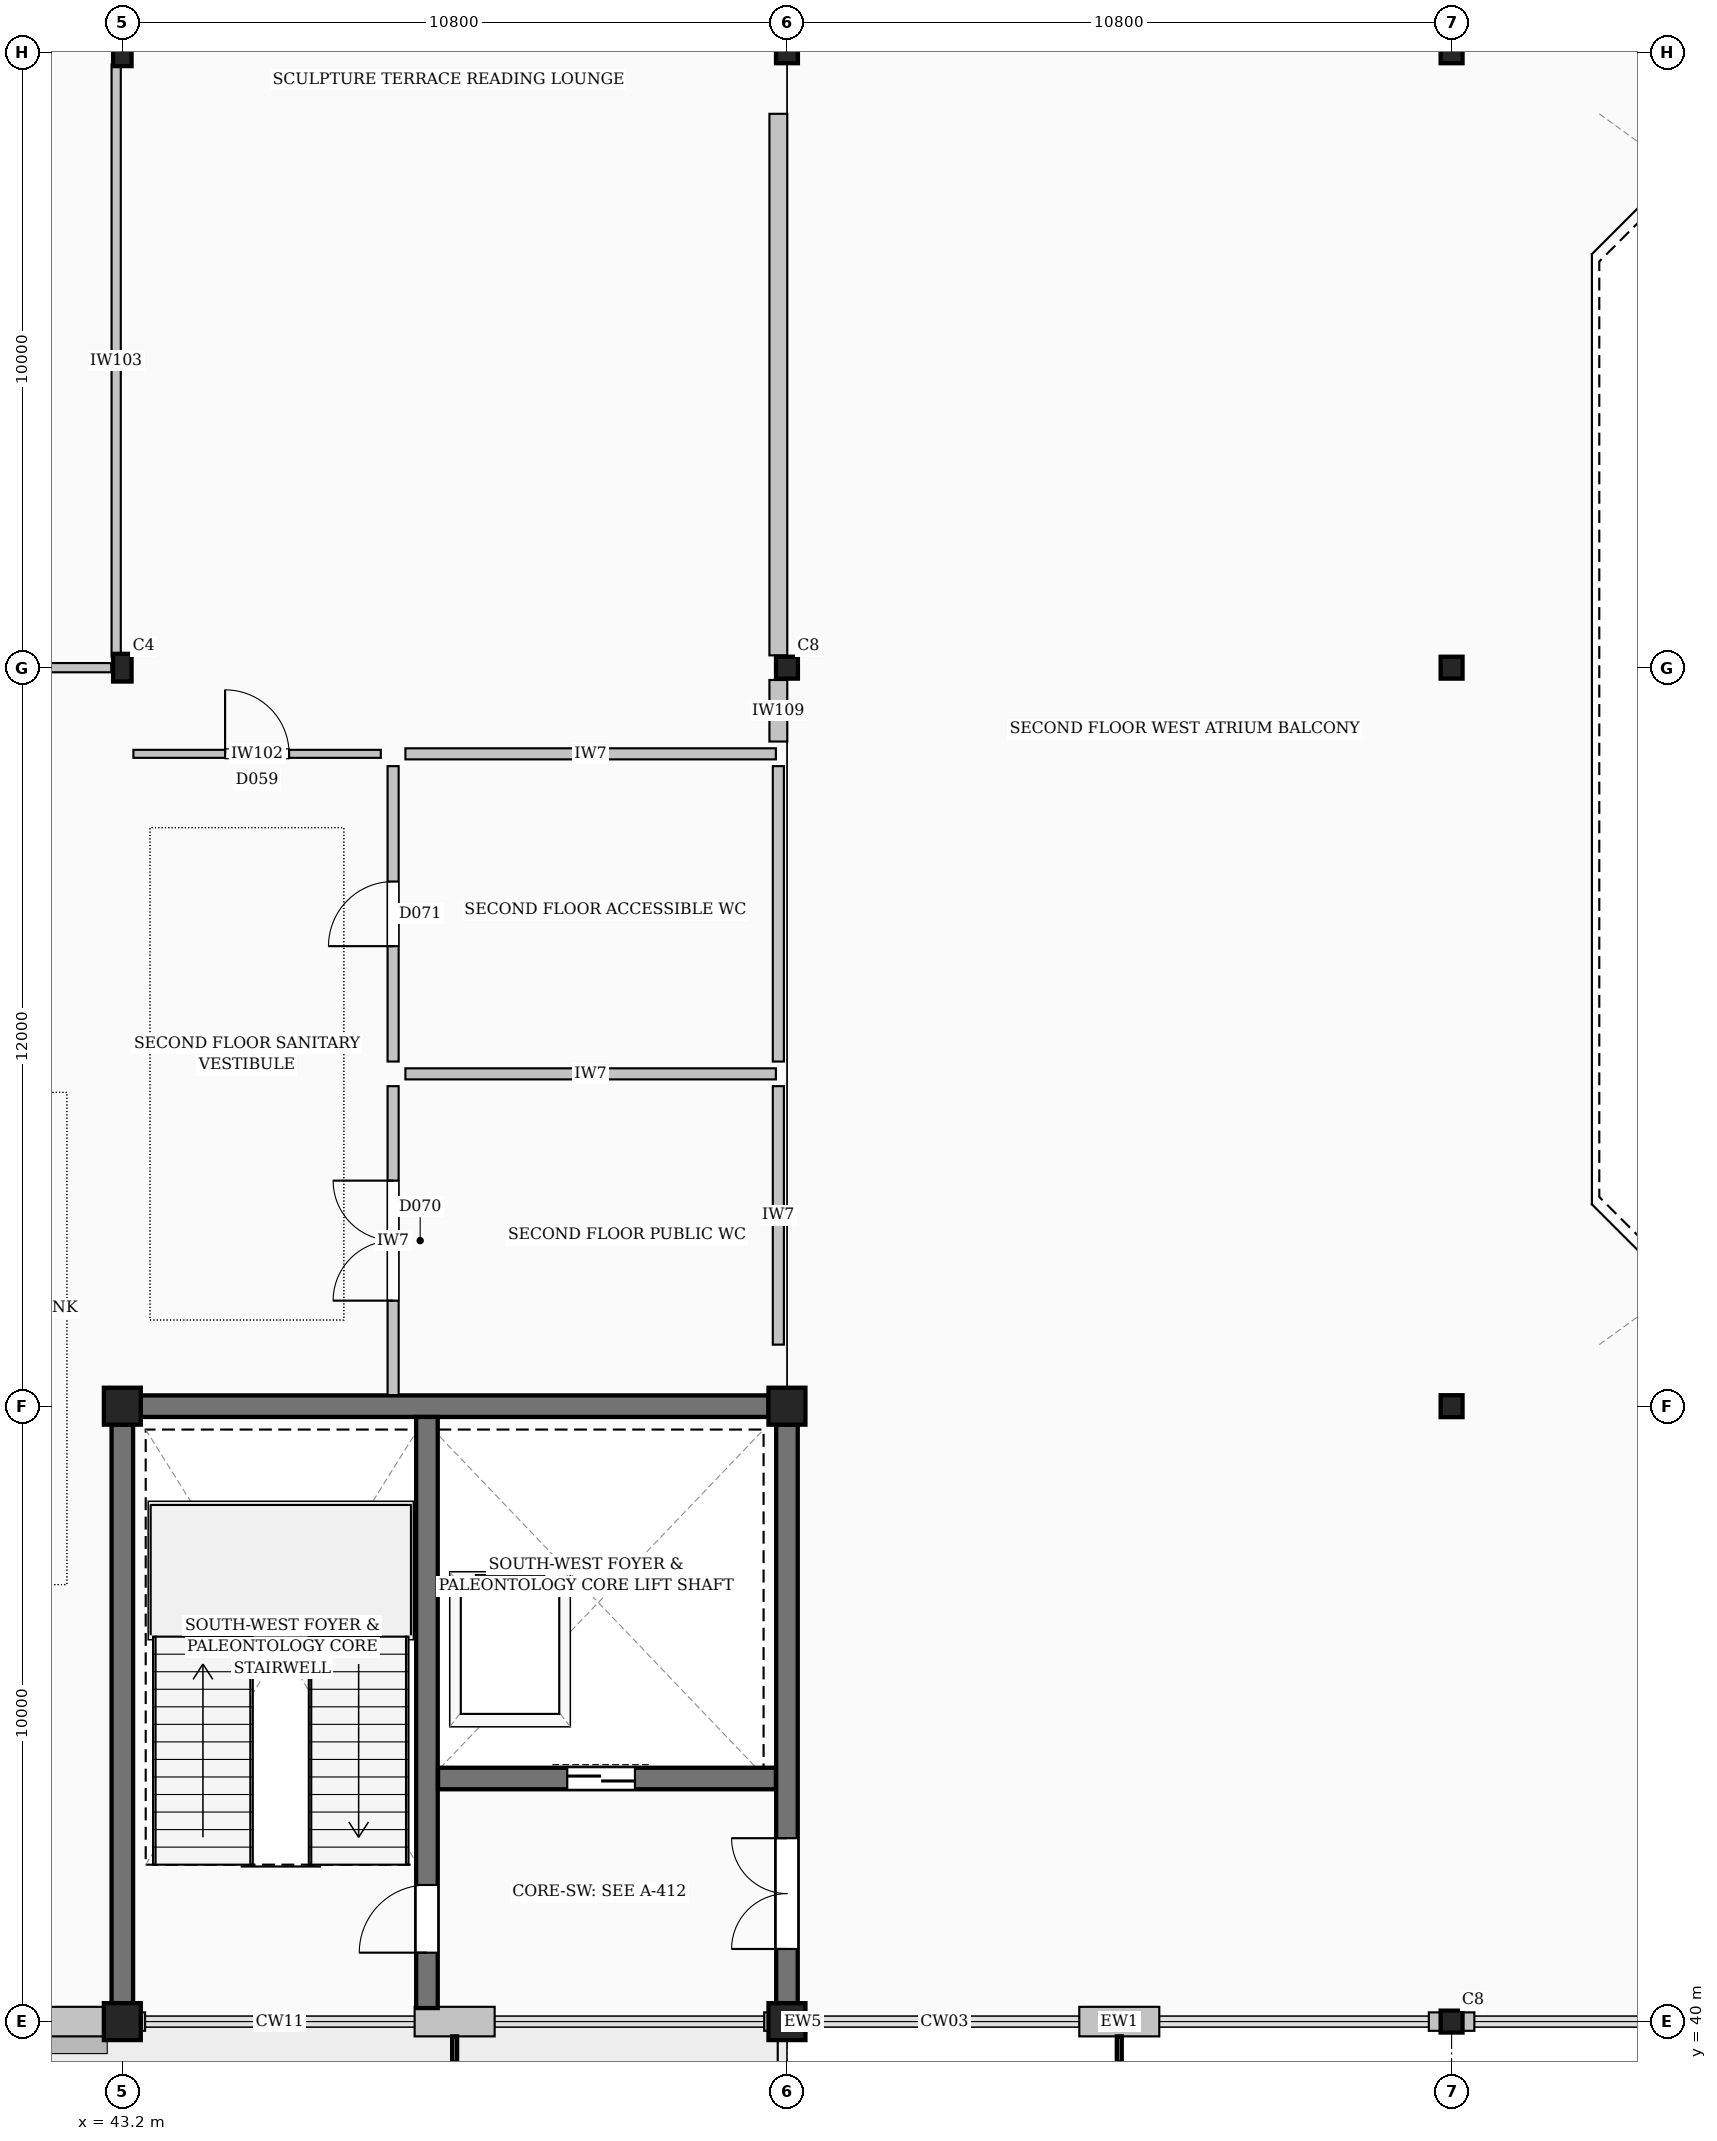
"""IFC4 building model, lengths in metres.
Left out: names, types, materials, properties, quantities, classifications, styles, units other than length and angle.
Written with IfcOpenShell. Run it as: python <this file> out.ifc"""

import sys

from ifc_helpers import new_model, si_unit, direction, frame, frame_2d, origin, origin_2d, place, context, subcontext, project, spatial, rectangle, hollow_circle, i_section, extrude, element, fill, save


model = new_model("IFC4")
c1 = context("Model", 3, precision=1e-05, world=origin(), true_north=direction((0.0, 1.0)))
c2 = subcontext(c1, "Body", "Model", "MODEL_VIEW")
j1 = project(units=[si_unit("LENGTHUNIT", "METRE"), si_unit("PLANEANGLEUNIT", "RADIAN")], contexts=[c1])
p1 = place(None, origin())
s1 = spatial("IfcSite", under=j1, at=p1, CompositionType="ELEMENT")
p2 = place(p1, origin())
s2 = spatial("IfcBuilding", under=s1, at=p2, CompositionType="ELEMENT")
p3 = place(p2, frame((0.0, 0.0, 9.6)))
s3 = spatial("IfcBuildingStorey", under=s2, at=p3, CompositionType="ELEMENT", Elevation=9.6)
for number, where, z_axis, x_axis in (
    (1, (43.2, 40.0, 0.0), (0.0, 0.0, 1.0), (1.0, 0.0, 0.0)),
    (2, (43.2, 50.0, 0.0), (0.0, 0.0, 1.0), (1.0, 0.0, 0.0)),
):
    element("IfcColumn", number, at=place(p3, frame(where, z_axis=z_axis, x_axis=x_axis)), inside=s3, PredefinedType="COLUMN", context=c2, shape_type="SweptSolid", body=[
        extrude(rectangle(XDim=0.6, YDim=0.6, at=origin_2d()), origin(), (0.0, 0.0, 1.0), 4.8),
    ])
for number, where, z_axis, x_axis in (
    (3, (43.2, 62.0, 0.0), (0.0, 0.0, 1.0), (1.0, 0.0, 0.0)),
    (4, (43.2, 72.0, 0.0), (0.0, 0.0, 1.0), (1.0, 0.0, 0.0)),
):
    element("IfcColumn", number, at=place(p3, frame(where, z_axis=z_axis, x_axis=x_axis)), inside=s3, PredefinedType="COLUMN", context=c2, shape_type="SweptSolid", body=[
        extrude(i_section(OverallWidth=0.3, OverallDepth=0.45, WebThickness=0.014, FlangeThickness=0.026, FilletRadius=0.027, at=origin_2d()), origin(), (0.0, 0.0, 1.0), 4.8),
    ])
for number, where, z_axis, x_axis in (
    (5, (54.0, 40.0, 0.0), (0.0, 0.0, 1.0), (1.0, 0.0, 0.0)),
    (6, (54.0, 50.0, 0.0), (0.0, 0.0, 1.0), (1.0, 0.0, 0.0)),
):
    element("IfcColumn", number, at=place(p3, frame(where, z_axis=z_axis, x_axis=x_axis)), inside=s3, PredefinedType="COLUMN", context=c2, shape_type="SweptSolid", body=[
        extrude(rectangle(XDim=0.6, YDim=0.6, at=origin_2d()), origin(), (0.0, 0.0, 1.0), 4.8),
    ])
for number, where, z_axis, x_axis in (
    (7, (54.0, 62.0, 0.0), (0.0, 0.0, 1.0), (1.0, 0.0, 0.0)),
    (8, (54.0, 72.0, 0.0), (0.0, 0.0, 1.0), (1.0, 0.0, 0.0)),
    (9, (64.8, 40.0, 0.0), (0.0, 0.0, 1.0), (1.0, 0.0, 0.0)),
    (10, (64.8, 50.0, 0.0), (0.0, 0.0, 1.0), (1.0, 0.0, 0.0)),
    (11, (64.8, 62.0, 0.0), (0.0, 0.0, 1.0), (1.0, 0.0, 0.0)),
    (12, (64.8, 72.0, 0.0), (0.0, 0.0, 1.0), (1.0, 0.0, 0.0)),
):
    element("IfcColumn", number, at=place(p3, frame(where, z_axis=z_axis, x_axis=x_axis)), inside=s3, PredefinedType="COLUMN", context=c2, shape_type="SweptSolid", body=[
        extrude(hollow_circle(Radius=0.178, WallThickness=0.016, at=origin_2d()), origin(), (0.0, 0.0, 1.0), 4.8),
    ])
p4 = place(p3, frame((32.545, 40.0, 0.0), z_axis=(0.0, 0.0, 1.0), x_axis=(1.0, 0.0, 0.0)))
e13 = element("IfcWall", 13, at=p4, inside=s3, PredefinedType="STANDARD", context=c2, shape_type="SweptSolid", body=[
    extrude(rectangle(XDim=10.51, YDim=0.48, at=frame_2d((5.255, 0.0))), origin(), (0.0, 0.0, 1.0), 4.09),
])
p5 = place(p4, frame((4.155, 0.0, 0.0)))
e14 = element("IfcOpeningElement", 14, at=p5, cuts=e13, PredefinedType="OPENING", context=c2, shape_type="SweptSolid", body=[
    extrude(rectangle(XDim=2.2, YDim=2.4, at=frame_2d((1.1, 1.2))), frame((0.0, 0.25, 0.0), z_axis=(0.0, -1.0, 0.0), x_axis=(1.0, 0.0, 0.0)), (0.0, 0.0, 1.0), 0.5),
])
p6 = place(p3, frame((47.95, 40.0, 0.0), z_axis=(0.0, 0.0, 1.0), x_axis=(1.0, 0.0, 0.0)))
e15 = element("IfcWall", 15, at=p6, inside=s3, PredefinedType="STANDARD", context=c2, shape_type="SweptSolid", body=[
    extrude(rectangle(XDim=1.3, YDim=0.48, at=frame_2d((0.65, 0.0))), origin(), (0.0, 0.0, 1.0), 4.09),
])
for number, where, z_axis, x_axis in (
    (16, (43.345, 40.0, 0.0), (0.0, 0.0, 1.0), (1.0, 0.0, 0.0)),
    (17, (53.63, 40.0, 0.0), (0.0, 0.0, 1.0), (1.0, 0.0, 0.0)),
):
    element("IfcWall", number, at=place(p3, frame(where, z_axis=z_axis, x_axis=x_axis)), inside=s3, PredefinedType="STANDARD", context=c2, shape_type="SweptSolid", body=[
        extrude(rectangle(XDim=0.225, YDim=0.3, at=frame_2d((0.113, 0.0))), origin(), (0.0, 0.0, 1.0), 4.56),
    ])
p7 = place(p3, frame((58.75, 40.0, 0.0), z_axis=(0.0, 0.0, 1.0), x_axis=(1.0, 0.0, 0.0)))
e18 = element("IfcWall", 18, at=p7, inside=s3, PredefinedType="STANDARD", context=c2, shape_type="SweptSolid", body=[
    extrude(rectangle(XDim=1.3, YDim=0.48, at=frame_2d((0.65, 0.0))), origin(), (0.0, 0.0, 1.0), 4.11),
])
for number, where, z_axis, x_axis in (
    (19, (54.145, 40.0, 0.0), (0.0, 0.0, 1.0), (1.0, 0.0, 0.0)),
    (20, (64.43, 40.0, 0.0), (0.0, 0.0, 1.0), (1.0, 0.0, 0.0)),
):
    element("IfcWall", number, at=place(p3, frame(where, z_axis=z_axis, x_axis=x_axis)), inside=s3, PredefinedType="STANDARD", context=c2, shape_type="SweptSolid", body=[
        extrude(rectangle(XDim=0.225, YDim=0.3, at=frame_2d((0.113, 0.0))), origin(), (0.0, 0.0, 1.0), 4.56),
    ])
p8 = place(p3, frame((64.945, 40.0, 0.0), z_axis=(0.0, 0.0, 1.0), x_axis=(1.0, 0.0, 0.0)))
e21 = element("IfcWall", 21, at=p8, inside=s3, PredefinedType="STANDARD", context=c2, shape_type="SweptSolid", body=[
    extrude(rectangle(XDim=0.225, YDim=0.3, at=frame_2d((0.112, 0.0))), origin(), (0.0, 0.0, 1.0), 4.56),
])
p9 = place(p3, frame((43.5, 50.0, 0.0), z_axis=(0.0, 0.0, 1.0), x_axis=(1.0, 0.0, 0.0)))
e22 = element("IfcWall", 22, at=p9, inside=s3, PredefinedType="SHEAR", context=c2, shape_type="SweptSolid", body=[
    extrude(rectangle(XDim=10.2, YDim=0.35, at=frame_2d((5.1, 0.0))), origin(), (0.0, 0.0, 1.0), 4.56),
])
p10 = place(p3, frame((43.2, 40.3, 0.0), z_axis=(0.0, 0.0, 1.0), x_axis=(0.0, 1.0, 0.0)))
e23 = element("IfcWall", 23, at=p10, inside=s3, PredefinedType="SHEAR", context=c2, shape_type="SweptSolid", body=[
    extrude(rectangle(XDim=9.4, YDim=0.35, at=frame_2d((4.7, 0.0))), origin(), (0.0, 0.0, 1.0), 4.56),
])
p11 = place(p3, frame((54.0, 40.3, 0.0), z_axis=(0.0, 0.0, 1.0), x_axis=(0.0, 1.0, 0.0)))
e24 = element("IfcWall", 24, at=p11, inside=s3, PredefinedType="SHEAR", context=c2, shape_type="SweptSolid", body=[
    extrude(rectangle(XDim=9.4, YDim=0.35, at=frame_2d((4.7, 0.0))), origin(), (0.0, 0.0, 1.0), 4.56),
])
p12 = place(p11, frame((0.88, 0.0, 0.0)))
e25 = element("IfcOpeningElement", 25, at=p12, cuts=e24, PredefinedType="OPENING", context=c2, shape_type="SweptSolid", body=[
    extrude(rectangle(XDim=1.8, YDim=2.25, at=frame_2d((0.9, 1.125))), frame((0.0, 0.185, 0.0), z_axis=(0.0, -1.0, 0.0), x_axis=(1.0, 0.0, 0.0)), (0.0, 0.0, 1.0), 0.37),
])
p13 = place(p3, frame((48.15, 40.22, 0.0), z_axis=(0.0, 0.0, 1.0), x_axis=(0.0, 1.0, 0.0)))
e26 = element("IfcWall", 26, at=p13, inside=s3, PredefinedType="SHEAR", context=c2, shape_type="SweptSolid", body=[
    extrude(rectangle(XDim=9.605, YDim=0.35, at=frame_2d((4.802, 0.0))), origin(), (0.0, 0.0, 1.0), 4.56),
])
p14 = place(p13, frame((0.9, 0.0, 0.0)))
e27 = element("IfcOpeningElement", 27, at=p14, cuts=e26, PredefinedType="OPENING", context=c2, shape_type="SweptSolid", body=[
    extrude(rectangle(XDim=1.1, YDim=2.2, at=frame_2d((0.55, 1.1))), frame((0.0, 0.185, 0.0), z_axis=(0.0, -1.0, 0.0), x_axis=(1.0, 0.0, 0.0)), (0.0, 0.0, 1.0), 0.37),
])
p15 = place(p3, frame((48.33, 43.95, 0.0), z_axis=(0.0, 0.0, 1.0), x_axis=(1.0, 0.0, 0.0)))
e28 = element("IfcWall", 28, at=p15, inside=s3, PredefinedType="SHEAR", context=c2, shape_type="SweptSolid", body=[
    extrude(rectangle(XDim=5.49, YDim=0.35, at=frame_2d((2.745, 0.0))), origin(), (0.0, 0.0, 1.0), 4.56),
])
p16 = place(p15, frame((2.1, 0.0, 0.0)))
e29 = element("IfcOpeningElement", 29, at=p16, cuts=e28, PredefinedType="OPENING", context=c2, shape_type="SweptSolid", body=[
    extrude(rectangle(XDim=1.1, YDim=2.2, at=frame_2d((0.55, 1.1))), frame((0.0, 0.185, 0.0), z_axis=(0.0, -1.0, 0.0), x_axis=(1.0, 0.0, 0.0)), (0.0, 0.0, 1.0), 0.37),
])
p17 = place(p3, frame((43.38, 60.6, 0.0), z_axis=(0.0, 0.0, 1.0), x_axis=(1.0, 0.0, 0.0)))
e30 = element("IfcWall", 30, at=p17, inside=s3, PredefinedType="PARTITIONING", context=c2, shape_type="SweptSolid", body=[
    extrude(rectangle(XDim=4.02, YDim=0.13, at=frame_2d((2.01, 0.0))), origin(), (0.0, 0.0, 1.0), 4.52),
])
p18 = place(p17, frame((1.49, 0.0, 0.0)))
e31 = element("IfcOpeningElement", 31, at=p18, cuts=e30, PredefinedType="OPENING", context=c2, shape_type="SweptSolid", body=[
    extrude(rectangle(XDim=1.04, YDim=2.2, at=frame_2d((0.52, 1.1))), frame((0.0, 0.075, 0.0), z_axis=(0.0, -1.0, 0.0), x_axis=(1.0, 0.0, 0.0)), (0.0, 0.0, 1.0), 0.15),
])
p19 = place(p3, frame((38.2, 62.0, 0.0), z_axis=(0.0, 0.0, 1.0), x_axis=(1.0, 0.0, 0.0)))
e32 = element("IfcWall", 32, at=p19, inside=s3, PredefinedType="PARTITIONING", context=c2, shape_type="SweptSolid", body=[
    extrude(rectangle(XDim=4.82, YDim=0.15, at=frame_2d((2.41, 0.0))), origin(), (0.0, 0.0, 1.0), 4.099),
])
p20 = place(p19, frame((1.9, 0.0, 0.0)))
e33 = element("IfcOpeningElement", 33, at=p20, cuts=e32, PredefinedType="OPENING", context=c2, shape_type="SweptSolid", body=[
    extrude(rectangle(XDim=1.02, YDim=2.2, at=frame_2d((0.51, 1.1))), frame((0.0, 0.085, 0.0), z_axis=(0.0, -1.0, 0.0), x_axis=(1.0, 0.0, 0.0)), (0.0, 0.0, 1.0), 0.17),
])
p21 = place(p3, frame((47.6, 50.18, 0.0), z_axis=(0.0, 0.0, 1.0), x_axis=(0.0, 1.0, 0.0)))
e34 = element("IfcWall", 34, at=p21, inside=s3, PredefinedType="PLUMBINGWALL", context=c2, shape_type="SweptSolid", body=[
    extrude(rectangle(XDim=5.02, YDim=0.18, at=frame_2d((2.51, 0.0))), origin(), (0.0, 0.0, 1.0), 4.52),
])
p22 = place(p21, frame((1.535, 0.0, 0.0)))
e35 = element("IfcOpeningElement", 35, at=p22, cuts=e34, PredefinedType="OPENING", context=c2, shape_type="SweptSolid", body=[
    extrude(rectangle(XDim=1.95, YDim=2.5, at=frame_2d((0.975, 1.25))), frame((0.0, 0.1, 0.0), z_axis=(0.0, -1.0, 0.0), x_axis=(1.0, 0.0, 0.0)), (0.0, 0.0, 1.0), 0.2),
])
p23 = place(p3, frame((47.6, 55.6, 0.0), z_axis=(0.0, 0.0, 1.0), x_axis=(0.0, 1.0, 0.0)))
e36 = element("IfcWall", 36, at=p23, inside=s3, PredefinedType="PLUMBINGWALL", context=c2, shape_type="SweptSolid", body=[
    extrude(rectangle(XDim=4.8, YDim=0.18, at=frame_2d((2.4, 0.0))), origin(), (0.0, 0.0, 1.0), 4.52),
])
p24 = place(p23, frame((1.875, 0.0, 0.0)))
e37 = element("IfcOpeningElement", 37, at=p24, cuts=e36, PredefinedType="OPENING", context=c2, shape_type="SweptSolid", body=[
    extrude(rectangle(XDim=1.05, YDim=2.15, at=frame_2d((0.525, 1.075))), frame((0.0, 0.1, 0.0), z_axis=(0.0, -1.0, 0.0), x_axis=(1.0, 0.0, 0.0)), (0.0, 0.0, 1.0), 0.2),
])
for number, where, z_axis, x_axis in (
    (38, (47.8, 55.4, 0.0), (0.0, 0.0, 1.0), (1.0, 0.0, 0.0)),
    (39, (47.8, 60.6, 0.0), (0.0, 0.0, 1.0), (1.0, 0.0, 0.0)),
):
    element("IfcWall", number, at=place(p3, frame(where, z_axis=z_axis, x_axis=x_axis)), inside=s3, PredefinedType="PLUMBINGWALL", context=c2, shape_type="SweptSolid", body=[
        extrude(rectangle(XDim=6.02, YDim=0.18, at=frame_2d((3.01, 0.0))), origin(), (0.0, 0.0, 1.0), 4.52),
    ])
p25 = place(p3, frame((43.1, 62.18, 0.0), z_axis=(0.0, 0.0, 1.0), x_axis=(0.0, 1.0, 0.0)))
e40 = element("IfcWall", 40, at=p25, inside=s3, PredefinedType="PARTITIONING", context=c2, shape_type="SweptSolid", body=[
    extrude(rectangle(XDim=9.62, YDim=0.15, at=frame_2d((4.81, 0.0))), origin(), (0.0, 0.0, 1.0), 4.039),
])
p26 = place(p3, frame((53.86, 51.0, 0.0), z_axis=(0.0, 0.0, 1.0), x_axis=(0.0, 1.0, 0.0)))
e41 = element("IfcWall", 41, at=p26, inside=s3, PredefinedType="PLUMBINGWALL", context=c2, shape_type="SweptSolid", body=[
    extrude(rectangle(XDim=4.2, YDim=0.18, at=frame_2d((2.1, 0.0))), origin(), (0.0, 0.0, 1.0), 4.52),
])
p27 = place(p3, frame((53.86, 55.6, 0.0), z_axis=(0.0, 0.0, 1.0), x_axis=(0.0, 1.0, 0.0)))
e42 = element("IfcWall", 42, at=p27, inside=s3, PredefinedType="PLUMBINGWALL", context=c2, shape_type="SweptSolid", body=[
    extrude(rectangle(XDim=4.8, YDim=0.18, at=frame_2d((2.4, 0.0))), origin(), (0.0, 0.0, 1.0), 4.52),
])
p28 = place(p3, frame((53.86, 60.8, 0.0), z_axis=(0.0, 0.0, 1.0), x_axis=(0.0, 1.0, 0.0)))
e43 = element("IfcWall", 43, at=p28, inside=s3, PredefinedType="PARTITIONING", context=c2, shape_type="SweptSolid", body=[
    extrude(rectangle(XDim=1.0, YDim=0.29, at=frame_2d((0.5, 0.0))), origin(), (0.0, 0.0, 1.0), 4.52),
])
p29 = place(p3, frame((53.86, 62.2, 0.0), z_axis=(0.0, 0.0, 1.0), x_axis=(0.0, 1.0, 0.0)))
e44 = element("IfcWall", 44, at=p29, inside=s3, PredefinedType="PARTITIONING", context=c2, shape_type="SweptSolid", body=[
    extrude(rectangle(XDim=8.8, YDim=0.29, at=frame_2d((4.4, 0.0))), origin(), (0.0, 0.0, 1.0), 4.52),
])
p30 = place(p14, origin())
e45 = element("IfcDoor", 45, at=p30, inside=s3, OperationType="SINGLE_SWING_LEFT", PredefinedType="DOOR", context=c2, shape_type="SweptSolid", body=[
    extrude(rectangle(XDim=1.1, YDim=2.2, at=frame_2d((0.55, 1.1))), frame((0.0, 0.025, 0.0), z_axis=(0.0, -1.0, 0.0), x_axis=(1.0, 0.0, 0.0)), (0.0, 0.0, 1.0), 0.05),
])
fill(e27, e45)
p31 = place(p12, origin())
e46 = element("IfcDoor", 46, at=p31, inside=s3, OperationType="DOUBLE_DOOR_SINGLE_SWING", PredefinedType="DOOR", context=c2, shape_type="SweptSolid", body=[
    extrude(rectangle(XDim=1.8, YDim=2.25, at=frame_2d((0.9, 1.125))), frame((0.0, 0.025, 0.0), z_axis=(0.0, -1.0, 0.0), x_axis=(1.0, 0.0, 0.0)), (0.0, 0.0, 1.0), 0.05),
])
fill(e25, e46)
p32 = place(p16, origin())
e47 = element("IfcDoor", 47, at=p32, inside=s3, OperationType="DOUBLE_DOOR_SLIDING", PredefinedType="DOOR", context=c2, shape_type="SweptSolid", body=[
    extrude(rectangle(XDim=1.1, YDim=2.2, at=frame_2d((0.55, 1.1))), frame((0.0, 0.025, 0.0), z_axis=(0.0, -1.0, 0.0), x_axis=(1.0, 0.0, 0.0)), (0.0, 0.0, 1.0), 0.05),
])
fill(e29, e47)
p33 = place(p18, origin())
e48 = element("IfcDoor", 48, at=p33, inside=s3, OperationType="SINGLE_SWING_LEFT", PredefinedType="DOOR", context=c2, shape_type="SweptSolid", body=[
    extrude(rectangle(XDim=1.04, YDim=2.2, at=frame_2d((0.52, 1.1))), frame((0.0, 0.025, 0.0), z_axis=(0.0, -1.0, 0.0), x_axis=(1.0, 0.0, 0.0)), (0.0, 0.0, 1.0), 0.05),
])
fill(e31, e48)
p34 = place(p22, origin())
e49 = element("IfcDoor", 49, at=p34, inside=s3, OperationType="DOUBLE_DOOR_SINGLE_SWING", PredefinedType="DOOR", context=c2, shape_type="SweptSolid", body=[
    extrude(rectangle(XDim=1.95, YDim=2.5, at=frame_2d((0.975, 1.25))), frame((0.0, 0.025, 0.0), z_axis=(0.0, -1.0, 0.0), x_axis=(1.0, 0.0, 0.0)), (0.0, 0.0, 1.0), 0.05),
])
fill(e35, e49)
p35 = place(p24, origin())
e50 = element("IfcDoor", 50, at=p35, inside=s3, OperationType="SINGLE_SWING_LEFT", PredefinedType="DOOR", context=c2, shape_type="SweptSolid", body=[
    extrude(rectangle(XDim=1.05, YDim=2.15, at=frame_2d((0.525, 1.075))), frame((0.0, 0.025, 0.0), z_axis=(0.0, -1.0, 0.0), x_axis=(1.0, 0.0, 0.0)), (0.0, 0.0, 1.0), 0.05),
])
fill(e37, e50)
save(model, sys.argv[1])
